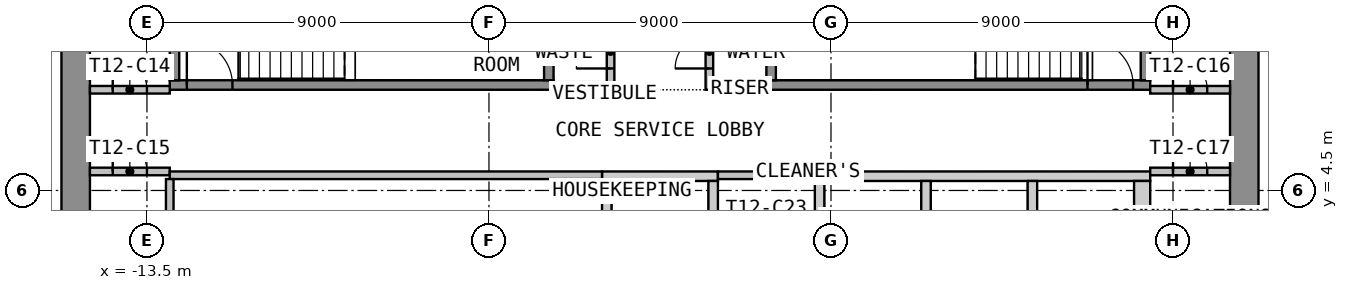
"""IFC4 building model, lengths in metres.
Left out: names, types, materials, properties, quantities, classifications, styles, units other than length and angle.
Written with IfcOpenShell. Run it as: python <this file> out.ifc"""

import sys

from ifc_helpers import new_model, si_unit, direction, frame, frame_2d, origin, place, context, subcontext, project, spatial, polyline, rectangle, outline, extrude, element, fill, save


model = new_model("IFC4")
c1 = context("Model", 3, precision=1e-05, world=origin(), true_north=direction((0.0, 1.0)))
c2 = subcontext(c1, "Body", "Model", "MODEL_VIEW")
j1 = project(units=[si_unit("LENGTHUNIT", "METRE"), si_unit("PLANEANGLEUNIT", "RADIAN")], contexts=[c1])
p1 = place(None, origin())
s1 = spatial("IfcSite", under=j1, at=p1, CompositionType="ELEMENT")
p2 = place(p1, origin())
s2 = spatial("IfcBuilding", under=s1, at=p2, CompositionType="ELEMENT")
p3 = place(p2, frame((0.0, 0.0, 167.7)))
s3 = spatial("IfcBuildingStorey", under=s2, at=p3, CompositionType="ELEMENT", Elevation=167.7)
p4 = place(p3, frame((-15.375, -12.75, 0.0), z_axis=(0.0, 0.0, 1.0), x_axis=(0.0, 1.0, 0.0)))
e1 = element("IfcWall", 1, at=p4, inside=s3, PredefinedType="SHEAR", context=c2, shape_type="SweptSolid", body=[
    extrude(rectangle(XDim=25.5, YDim=0.75, at=frame_2d((12.75, 0.0))), origin(), (0.0, 0.0, 1.0), 3.575),
])
p5 = place(p4, frame((11.55, 0.0, 0.0)))
e2 = element("IfcOpeningElement", 2, at=p5, cuts=e1, PredefinedType="OPENING", context=c2, shape_type="SweptSolid", body=[
    extrude(rectangle(XDim=2.4, YDim=2.1, at=frame_2d((1.2, 1.05))), frame((0.0, 0.385, 0.0), z_axis=(0.0, -1.0, 0.0), x_axis=(1.0, 0.0, 0.0)), (0.0, 0.0, 1.0), 0.77),
])
p6 = place(p3, frame((15.375, -12.75, 0.0), z_axis=(0.0, 0.0, 1.0), x_axis=(0.0, 1.0, 0.0)))
e3 = element("IfcWall", 3, at=p6, inside=s3, PredefinedType="SHEAR", context=c2, shape_type="SweptSolid", body=[
    extrude(rectangle(XDim=25.5, YDim=0.75, at=frame_2d((12.75, 0.0))), origin(), (0.0, 0.0, 1.0), 3.575),
])
p7 = place(p6, frame((11.55, 0.0, 0.0)))
e4 = element("IfcOpeningElement", 4, at=p7, cuts=e3, PredefinedType="OPENING", context=c2, shape_type="SweptSolid", body=[
    extrude(rectangle(XDim=2.4, YDim=2.1, at=frame_2d((1.2, 1.05))), frame((0.0, 0.385, 0.0), z_axis=(0.0, -1.0, 0.0), x_axis=(1.0, 0.0, 0.0)), (0.0, 0.0, 1.0), 0.77),
])
p8 = place(p3, origin())
e5 = element("IfcWall", 5, at=p8, inside=s3, PredefinedType="SHEAR", context=c2, shape_type="SweptSolid", body=[
    extrude(outline(polyline([(-1.525, 4.75), (1.525, 4.75), (1.525, 5.0), (-1.525, 5.0), (-1.525, 4.75)])), origin(), (0.0, 0.0, 1.0), 3.575),
])
p9 = place(p3, origin())
e6 = element("IfcWall", 6, at=p9, inside=s3, PredefinedType="SHEAR", context=c2, shape_type="SweptSolid", body=[
    extrude(outline(polyline([(4.075, 4.75), (12.9, 4.75), (12.9, 5.0), (4.075, 5.0), (4.075, 4.75)])), origin(), (0.0, 0.0, 1.0), 3.575),
])
p10 = place(p3, origin())
e7 = element("IfcWall", 7, at=p10, inside=s3, PredefinedType="SHEAR", context=c2, shape_type="SweptSolid", body=[
    extrude(outline(polyline([(-1.525, 2.05), (-1.275, 2.05), (-1.275, 4.75), (-1.525, 4.75), (-1.525, 2.05)])), origin(), (0.0, 0.0, 1.0), 3.575),
])
p11 = place(p3, origin())
e8 = element("IfcWall", 8, at=p11, inside=s3, PredefinedType="SHEAR", context=c2, shape_type="SweptSolid", body=[
    extrude(outline(polyline([(1.275, 2.05), (1.525, 2.05), (1.525, 4.75), (1.275, 4.75), (1.275, 2.05)])), origin(), (0.0, 0.0, 1.0), 3.575),
])
p12 = place(p3, origin())
e9 = element("IfcWall", 9, at=p12, inside=s3, PredefinedType="SHEAR", context=c2, shape_type="SweptSolid", body=[
    extrude(outline(polyline([(9.675, 2.05), (9.925, 2.05), (9.925, 4.75), (9.675, 4.75), (9.675, 2.05)])), origin(), (0.0, 0.0, 1.0), 3.575),
])
p13 = place(p3, origin())
e10 = element("IfcWall", 10, at=p13, inside=s3, PredefinedType="SHEAR", context=c2, shape_type="SweptSolid", body=[
    extrude(outline(polyline([(12.475, 2.05), (12.9, 2.05), (12.9, 4.75), (12.475, 4.75), (12.475, 2.05)])), origin(), (0.0, 0.0, 1.0), 3.575),
])
p14 = place(p3, origin())
e11 = element("IfcWall", 11, at=p14, inside=s3, PredefinedType="SHEAR", context=c2, shape_type="SweptSolid", body=[
    extrude(outline(polyline([(4.075, 3.05), (4.325, 3.05), (4.325, 4.75), (4.075, 4.75), (4.075, 3.05)])), origin(), (0.0, 0.0, 1.0), 3.575),
])
p15 = place(p3, origin())
e12 = element("IfcWall", 12, at=p15, inside=s3, PredefinedType="SHEAR", context=c2, shape_type="SweptSolid", body=[
    extrude(outline(polyline([(6.875, 3.05), (7.125, 3.05), (7.125, 4.75), (6.875, 4.75), (6.875, 3.05)])), origin(), (0.0, 0.0, 1.0), 3.575),
])
p16 = place(p3, frame((-12.9, 7.275, 0.0), z_axis=(0.0, 0.0, 1.0), x_axis=(1.0, 0.0, 0.0)))
e13 = element("IfcWall", 13, at=p16, inside=s3, PredefinedType="SHEAR", context=c2, shape_type="SweptSolid", body=[
    extrude(rectangle(XDim=10.1, YDim=0.25, at=frame_2d((5.05, 0.0))), origin(), (0.0, 0.0, 1.0), 3.575),
])
p17 = place(p16, frame((0.45, 0.0, 0.0)))
e14 = element("IfcOpeningElement", 14, at=p17, cuts=e13, PredefinedType="OPENING", context=c2, shape_type="SweptSolid", body=[
    extrude(rectangle(XDim=1.2, YDim=2.1, at=frame_2d((0.6, 1.05))), frame((0.0, 0.135, 0.0), z_axis=(0.0, -1.0, 0.0), x_axis=(1.0, 0.0, 0.0)), (0.0, 0.0, 1.0), 0.27),
])
for number, where, z_axis, x_axis in (
    (15, (-12.775, 7.4, 0.0), (0.0, 0.0, 1.0), (0.0, 1.0, 0.0)),
    (16, (-2.925, 7.4, 0.0), (0.0, 0.0, 1.0), (0.0, 1.0, 0.0)),
):
    element("IfcWall", number, at=place(p3, frame(where, z_axis=z_axis, x_axis=x_axis)), inside=s3, PredefinedType="SHEAR", context=c2, shape_type="SweptSolid", body=[
        extrude(rectangle(XDim=3.25, YDim=0.25, at=frame_2d((1.625, 0.0))), origin(), (0.0, 0.0, 1.0), 3.575),
    ])
p18 = place(p3, frame((2.8, 7.275, 0.0), z_axis=(0.0, 0.0, 1.0), x_axis=(1.0, 0.0, 0.0)))
e17 = element("IfcWall", 17, at=p18, inside=s3, PredefinedType="SHEAR", context=c2, shape_type="SweptSolid", body=[
    extrude(rectangle(XDim=10.1, YDim=0.25, at=frame_2d((5.05, 0.0))), origin(), (0.0, 0.0, 1.0), 3.575),
])
p19 = place(p18, frame((8.45, 0.0, 0.0)))
e18 = element("IfcOpeningElement", 18, at=p19, cuts=e17, PredefinedType="OPENING", context=c2, shape_type="SweptSolid", body=[
    extrude(rectangle(XDim=1.2, YDim=2.1, at=frame_2d((0.6, 1.05))), frame((0.0, 0.135, 0.0), z_axis=(0.0, -1.0, 0.0), x_axis=(1.0, 0.0, 0.0)), (0.0, 0.0, 1.0), 0.27),
])
for number, where, z_axis, x_axis in (
    (19, (2.925, 7.4, 0.0), (0.0, 0.0, 1.0), (0.0, 1.0, 0.0)),
    (20, (12.775, 7.4, 0.0), (0.0, 0.0, 1.0), (0.0, 1.0, 0.0)),
):
    element("IfcWall", number, at=place(p3, frame(where, z_axis=z_axis, x_axis=x_axis)), inside=s3, PredefinedType="SHEAR", context=c2, shape_type="SweptSolid", body=[
        extrude(rectangle(XDim=3.25, YDim=0.25, at=frame_2d((1.625, 0.0))), origin(), (0.0, 0.0, 1.0), 3.575),
    ])
for number, where, z_axis, x_axis in (
    (21, (-2.8, 7.25, 0.0), (0.0, 0.0, 1.0), (1.0, 0.0, 0.0)),
    (22, (1.4, 7.25, 0.0), (0.0, 0.0, 1.0), (1.0, 0.0, 0.0)),
):
    element("IfcWall", number, at=place(p3, frame(where, z_axis=z_axis, x_axis=x_axis)), inside=s3, PredefinedType="PARTITIONING", context=c2, shape_type="SweptSolid", body=[
        extrude(rectangle(XDim=1.4, YDim=0.2, at=frame_2d((0.7, 0.0))), origin(), (0.0, 0.0, 1.0), 3.575),
    ])
p20 = place(p3, frame((-1.3, 7.15, 0.0), z_axis=(0.0, 0.0, 1.0), x_axis=(0.0, 1.0, 0.0)))
e23 = element("IfcWall", 23, at=p20, inside=s3, PredefinedType="PARTITIONING", context=c2, shape_type="SweptSolid", body=[
    extrude(rectangle(XDim=5.6, YDim=0.2, at=frame_2d((2.8, 0.0))), origin(), (0.0, 0.0, 1.0), 3.575),
])
p21 = place(p20, frame((0.56, 0.0, 0.0)))
e24 = element("IfcOpeningElement", 24, at=p21, cuts=e23, PredefinedType="OPENING", context=c2, shape_type="SweptSolid", body=[
    extrude(rectangle(XDim=0.9, YDim=2.1, at=frame_2d((0.45, 1.05))), frame((0.0, 0.11, 0.0), z_axis=(0.0, -1.0, 0.0), x_axis=(1.0, 0.0, 0.0)), (0.0, 0.0, 1.0), 0.22),
])
p22 = place(p20, frame((3.26, 0.0, 0.0)))
e25 = element("IfcOpeningElement", 25, at=p22, cuts=e23, PredefinedType="OPENING", context=c2, shape_type="SweptSolid", body=[
    extrude(rectangle(XDim=0.9, YDim=2.1, at=frame_2d((0.45, 1.05))), frame((0.0, 0.11, 0.0), z_axis=(0.0, -1.0, 0.0), x_axis=(1.0, 0.0, 0.0)), (0.0, 0.0, 1.0), 0.22),
])
p23 = place(p3, frame((1.3, 7.15, 0.0), z_axis=(0.0, 0.0, 1.0), x_axis=(0.0, 1.0, 0.0)))
e26 = element("IfcWall", 26, at=p23, inside=s3, PredefinedType="PARTITIONING", context=c2, shape_type="SweptSolid", body=[
    extrude(rectangle(XDim=5.6, YDim=0.2, at=frame_2d((2.8, 0.0))), origin(), (0.0, 0.0, 1.0), 3.575),
])
p24 = place(p23, frame((0.56, 0.0, 0.0)))
e27 = element("IfcOpeningElement", 27, at=p24, cuts=e26, PredefinedType="OPENING", context=c2, shape_type="SweptSolid", body=[
    extrude(rectangle(XDim=0.9, YDim=2.1, at=frame_2d((0.45, 1.05))), frame((0.0, 0.11, 0.0), z_axis=(0.0, -1.0, 0.0), x_axis=(1.0, 0.0, 0.0)), (0.0, 0.0, 1.0), 0.22),
])
p25 = place(p23, frame((3.26, 0.0, 0.0)))
e28 = element("IfcOpeningElement", 28, at=p25, cuts=e26, PredefinedType="OPENING", context=c2, shape_type="SweptSolid", body=[
    extrude(rectangle(XDim=0.9, YDim=2.1, at=frame_2d((0.45, 1.05))), frame((0.0, 0.11, 0.0), z_axis=(0.0, -1.0, 0.0), x_axis=(1.0, 0.0, 0.0)), (0.0, 0.0, 1.0), 0.22),
])
p26 = place(p3, frame((-15.0, 7.15, 0.0), z_axis=(0.0, 0.0, 1.0), x_axis=(1.0, 0.0, 0.0)))
e29 = element("IfcWall", 29, at=p26, inside=s3, PredefinedType="PARTITIONING", context=c2, shape_type="SweptSolid", body=[
    extrude(rectangle(XDim=2.1, YDim=0.2, at=frame_2d((1.05, 0.0))), origin(), (0.0, 0.0, 1.0), 3.575),
])
p27 = place(p26, frame((0.6, 0.0, 0.0)))
e30 = element("IfcOpeningElement", 30, at=p27, cuts=e29, PredefinedType="OPENING", context=c2, shape_type="SweptSolid", body=[
    extrude(rectangle(XDim=0.9, YDim=2.1, at=frame_2d((0.45, 1.05))), frame((0.0, 0.11, 0.0), z_axis=(0.0, -1.0, 0.0), x_axis=(1.0, 0.0, 0.0)), (0.0, 0.0, 1.0), 0.22),
])
p28 = place(p3, frame((-15.0, 5.0, 0.0), z_axis=(0.0, 0.0, 1.0), x_axis=(1.0, 0.0, 0.0)))
e31 = element("IfcWall", 31, at=p28, inside=s3, PredefinedType="PARTITIONING", context=c2, shape_type="SweptSolid", body=[
    extrude(rectangle(XDim=2.1, YDim=0.2, at=frame_2d((1.05, 0.0))), origin(), (0.0, 0.0, 1.0), 3.575),
])
p29 = place(p28, frame((0.6, 0.0, 0.0)))
e32 = element("IfcOpeningElement", 32, at=p29, cuts=e31, PredefinedType="OPENING", context=c2, shape_type="SweptSolid", body=[
    extrude(rectangle(XDim=0.9, YDim=2.1, at=frame_2d((0.45, 1.05))), frame((0.0, 0.11, 0.0), z_axis=(0.0, -1.0, 0.0), x_axis=(1.0, 0.0, 0.0)), (0.0, 0.0, 1.0), 0.22),
])
p30 = place(p3, frame((12.9, 7.15, 0.0), z_axis=(0.0, 0.0, 1.0), x_axis=(1.0, 0.0, 0.0)))
e33 = element("IfcWall", 33, at=p30, inside=s3, PredefinedType="PARTITIONING", context=c2, shape_type="SweptSolid", body=[
    extrude(rectangle(XDim=2.1, YDim=0.2, at=frame_2d((1.05, 0.0))), origin(), (0.0, 0.0, 1.0), 3.575),
])
p31 = place(p30, frame((0.6, 0.0, 0.0)))
e34 = element("IfcOpeningElement", 34, at=p31, cuts=e33, PredefinedType="OPENING", context=c2, shape_type="SweptSolid", body=[
    extrude(rectangle(XDim=0.9, YDim=2.1, at=frame_2d((0.45, 1.05))), frame((0.0, 0.11, 0.0), z_axis=(0.0, -1.0, 0.0), x_axis=(1.0, 0.0, 0.0)), (0.0, 0.0, 1.0), 0.22),
])
p32 = place(p3, frame((12.9, 5.0, 0.0), z_axis=(0.0, 0.0, 1.0), x_axis=(1.0, 0.0, 0.0)))
e35 = element("IfcWall", 35, at=p32, inside=s3, PredefinedType="PARTITIONING", context=c2, shape_type="SweptSolid", body=[
    extrude(rectangle(XDim=2.1, YDim=0.2, at=frame_2d((1.05, 0.0))), origin(), (0.0, 0.0, 1.0), 3.575),
])
p33 = place(p32, frame((0.6, 0.0, 0.0)))
e36 = element("IfcOpeningElement", 36, at=p33, cuts=e35, PredefinedType="OPENING", context=c2, shape_type="SweptSolid", body=[
    extrude(rectangle(XDim=0.9, YDim=2.1, at=frame_2d((0.45, 1.05))), frame((0.0, 0.11, 0.0), z_axis=(0.0, -1.0, 0.0), x_axis=(1.0, 0.0, 0.0)), (0.0, 0.0, 1.0), 0.22),
])
p34 = place(p3, frame((-12.9, 4.9, 0.0), z_axis=(0.0, 0.0, 1.0), x_axis=(1.0, 0.0, 0.0)))
e37 = element("IfcWall", 37, at=p34, inside=s3, PredefinedType="PARTITIONING", context=c2, shape_type="SweptSolid", body=[
    extrude(rectangle(XDim=11.375, YDim=0.2, at=frame_2d((5.688, 0.0))), origin(), (0.0, 0.0, 1.0), 3.575),
])
p35 = place(p3, frame((-12.9, 2.0, 0.0), z_axis=(0.0, 0.0, 1.0), x_axis=(0.0, 1.0, 0.0)))
e38 = element("IfcWall", 38, at=p35, inside=s3, PredefinedType="PARTITIONING", context=c2, shape_type="SweptSolid", body=[
    extrude(rectangle(XDim=2.8, YDim=0.2, at=frame_2d((1.4, 0.0))), origin(), (0.0, 0.0, 1.0), 3.575),
])
p36 = place(p3, frame((1.525, 4.9, 0.0), z_axis=(0.0, 0.0, 1.0), x_axis=(1.0, 0.0, 0.0)))
e39 = element("IfcWall", 39, at=p36, inside=s3, PredefinedType="PARTITIONING", context=c2, shape_type="SweptSolid", body=[
    extrude(rectangle(XDim=2.55, YDim=0.2, at=frame_2d((1.275, 0.0))), origin(), (0.0, 0.0, 1.0), 3.575),
])
p37 = place(p17, origin())
e40 = element("IfcDoor", 40, at=p37, inside=s3, OperationType="SINGLE_SWING_LEFT", PredefinedType="DOOR", context=c2, shape_type="SweptSolid", body=[
    extrude(rectangle(XDim=1.2, YDim=2.1, at=frame_2d((0.6, 1.05))), frame((0.0, 0.025, 0.0), z_axis=(0.0, -1.0, 0.0), x_axis=(1.0, 0.0, 0.0)), (0.0, 0.0, 1.0), 0.05),
])
fill(e14, e40)
p38 = place(p19, origin())
e41 = element("IfcDoor", 41, at=p38, inside=s3, OperationType="SINGLE_SWING_LEFT", PredefinedType="DOOR", context=c2, shape_type="SweptSolid", body=[
    extrude(rectangle(XDim=1.2, YDim=2.1, at=frame_2d((0.6, 1.05))), frame((0.0, 0.025, 0.0), z_axis=(0.0, -1.0, 0.0), x_axis=(1.0, 0.0, 0.0)), (0.0, 0.0, 1.0), 0.05),
])
fill(e18, e41)
p39 = place(p21, origin())
e42 = element("IfcDoor", 42, at=p39, inside=s3, OperationType="SINGLE_SWING_LEFT", PredefinedType="DOOR", context=c2, shape_type="SweptSolid", body=[
    extrude(rectangle(XDim=0.9, YDim=2.1, at=frame_2d((0.45, 1.05))), frame((0.0, 0.025, 0.0), z_axis=(0.0, -1.0, 0.0), x_axis=(1.0, 0.0, 0.0)), (0.0, 0.0, 1.0), 0.05),
])
fill(e24, e42)
p40 = place(p24, origin())
e43 = element("IfcDoor", 43, at=p40, inside=s3, OperationType="SINGLE_SWING_LEFT", PredefinedType="DOOR", context=c2, shape_type="SweptSolid", body=[
    extrude(rectangle(XDim=0.9, YDim=2.1, at=frame_2d((0.45, 1.05))), frame((0.0, 0.025, 0.0), z_axis=(0.0, -1.0, 0.0), x_axis=(1.0, 0.0, 0.0)), (0.0, 0.0, 1.0), 0.05),
])
fill(e27, e43)
p41 = place(p27, origin())
e44 = element("IfcDoor", 44, at=p41, inside=s3, OperationType="SINGLE_SWING_LEFT", PredefinedType="DOOR", context=c2, shape_type="SweptSolid", body=[
    extrude(rectangle(XDim=0.9, YDim=2.1, at=frame_2d((0.45, 1.05))), frame((0.0, 0.025, 0.0), z_axis=(0.0, -1.0, 0.0), x_axis=(1.0, 0.0, 0.0)), (0.0, 0.0, 1.0), 0.05),
])
fill(e30, e44)
p42 = place(p29, origin())
e45 = element("IfcDoor", 45, at=p42, inside=s3, OperationType="SINGLE_SWING_LEFT", PredefinedType="DOOR", context=c2, shape_type="SweptSolid", body=[
    extrude(rectangle(XDim=0.9, YDim=2.1, at=frame_2d((0.45, 1.05))), frame((0.0, 0.025, 0.0), z_axis=(0.0, -1.0, 0.0), x_axis=(1.0, 0.0, 0.0)), (0.0, 0.0, 1.0), 0.05),
])
fill(e32, e45)
p43 = place(p31, origin())
e46 = element("IfcDoor", 46, at=p43, inside=s3, OperationType="SINGLE_SWING_LEFT", PredefinedType="DOOR", context=c2, shape_type="SweptSolid", body=[
    extrude(rectangle(XDim=0.9, YDim=2.1, at=frame_2d((0.45, 1.05))), frame((0.0, 0.025, 0.0), z_axis=(0.0, -1.0, 0.0), x_axis=(1.0, 0.0, 0.0)), (0.0, 0.0, 1.0), 0.05),
])
fill(e34, e46)
p44 = place(p33, origin())
e47 = element("IfcDoor", 47, at=p44, inside=s3, OperationType="SINGLE_SWING_LEFT", PredefinedType="DOOR", context=c2, shape_type="SweptSolid", body=[
    extrude(rectangle(XDim=0.9, YDim=2.1, at=frame_2d((0.45, 1.05))), frame((0.0, 0.025, 0.0), z_axis=(0.0, -1.0, 0.0), x_axis=(1.0, 0.0, 0.0)), (0.0, 0.0, 1.0), 0.05),
])
fill(e36, e47)
save(model, sys.argv[1])
